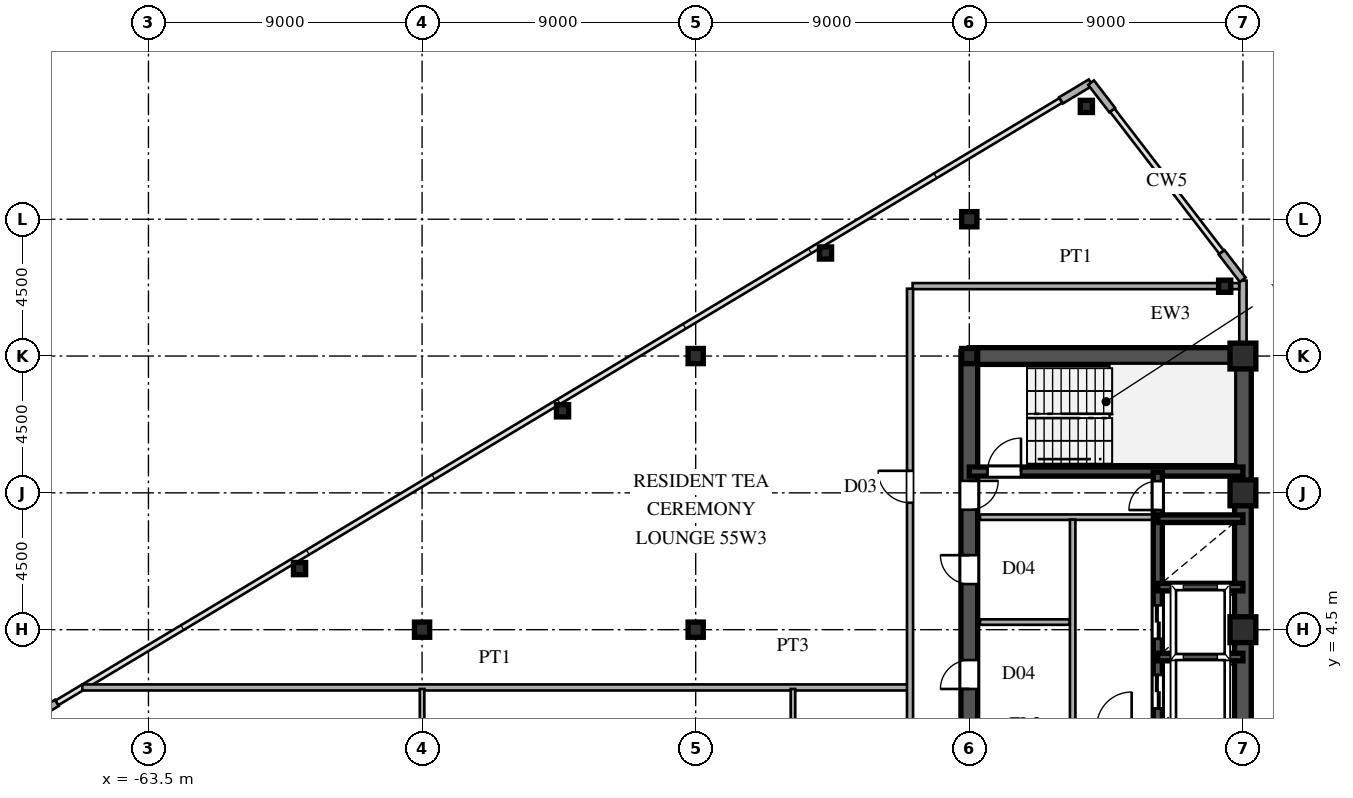
"""IFC4 building model, lengths in metres.
Left out: names, types, materials, properties, quantities, classifications, styles, units other than length and angle.
Written with IfcOpenShell. Run it as: python <this file> out.ifc"""

import sys

from ifc_helpers import new_model, si_unit, direction, frame, frame_2d, origin, origin_2d, place, context, subcontext, project, spatial, rectangle, hollow_rectangle, i_section, extrude, source, transform, mapped, element, fill, save


model = new_model("IFC4")
c1 = context("Model", 3, precision=1e-05, world=origin(), true_north=direction((0.0, 1.0)))
c2 = subcontext(c1, "Body", "Model", "MODEL_VIEW")
j1 = project(units=[si_unit("LENGTHUNIT", "METRE"), si_unit("PLANEANGLEUNIT", "RADIAN")], contexts=[c1])
p1 = place(None, origin())
s1 = spatial("IfcSite", under=j1, at=p1, CompositionType="ELEMENT")
p2 = place(p1, origin())
s2 = spatial("IfcBuilding", under=s1, at=p2, CompositionType="ELEMENT")
p3 = place(p2, frame((0.0, 0.0, 206.7)))
s3 = spatial("IfcBuildingStorey", under=s2, at=p3, CompositionType="ELEMENT", Elevation=206.7)
m1 = source(origin(), c2, "Body", "SweptSolid", [
    extrude(hollow_rectangle(XDim=0.85, YDim=0.85, WallThickness=0.036, at=origin_2d()), origin(), (0.0, 0.0, 1.0), 3.6),
])
for number, where, z_axis, x_axis in (
    (1, (-27.5, 4.5, 0.0), (0.0, 0.0, 1.0), (1.0, 0.0, 0.0)),
    (2, (-27.5, 9.0, 0.0), (0.0, 0.0, 1.0), (1.0, 0.0, 0.0)),
    (3, (-27.5, 13.5, 0.0), (0.0, 0.0, 1.0), (1.0, 0.0, 0.0)),
):
    element("IfcColumn", number, at=place(p3, frame(where, z_axis=z_axis, x_axis=x_axis)), inside=s3, PredefinedType="COLUMN", context=c2, shape_type="MappedRepresentation", body=[
        mapped(m1, transform((0.0, 0.0, 0.0), scale=1.0)),
    ])
m2 = source(origin(), c2, "Body", "SweptSolid", [
    extrude(i_section(OverallWidth=0.5, OverallDepth=0.5, WebThickness=0.02, FlangeThickness=0.032, at=origin_2d()), origin(), (0.0, 0.0, 1.0), 3.6),
])
for number, where, z_axis, x_axis in (
    (4, (-36.5, 13.5, 0.0), (0.0, 0.0, 1.0), (1.0, 0.0, 0.0)),
    (5, (-36.5, 18.0, 0.0), (0.0, 0.0, 1.0), (1.0, 0.0, 0.0)),
    (6, (-45.5, 4.5, 0.0), (0.0, 0.0, 1.0), (1.0, 0.0, 0.0)),
    (7, (-45.5, 13.5, 0.0), (0.0, 0.0, 1.0), (1.0, 0.0, 0.0)),
    (8, (-54.5, 4.5, 0.0), (0.0, 0.0, 1.0), (1.0, 0.0, 0.0)),
):
    element("IfcColumn", number, at=place(p3, frame(where, z_axis=z_axis, x_axis=x_axis)), inside=s3, PredefinedType="COLUMN", context=c2, shape_type="MappedRepresentation", body=[
        mapped(m2, transform((0.0, 0.0, 0.0), scale=1.0)),
    ])
m3 = source(origin(), c2, "Body", "SweptSolid", [
    extrude(hollow_rectangle(XDim=0.4, YDim=0.4, WallThickness=0.016, at=origin_2d()), origin(), (0.0, 0.0, 1.0), 3.6),
])
for number, where, z_axis, x_axis in (
    (9, (-28.1, 15.796, 0.0), (0.0, 0.0, 1.0), (1.0, 0.0, 0.0)),
    (10, (-32.65, 21.71, 0.0), (0.0, 0.0, 1.0), (1.0, 0.0, 0.0)),
    (11, (-41.23, 16.889, 0.0), (0.0, 0.0, 1.0), (1.0, 0.0, 0.0)),
    (12, (-49.88, 11.699, 0.0), (0.0, 0.0, 1.0), (1.0, 0.0, 0.0)),
    (13, (-58.53, 6.509, 0.0), (0.0, 0.0, 1.0), (1.0, 0.0, 0.0)),
):
    element("IfcColumn", number, at=place(p3, frame(where, z_axis=z_axis, x_axis=x_axis)), inside=s3, PredefinedType="COLUMN", context=c2, shape_type="MappedRepresentation", body=[
        mapped(m3, transform((0.0, 0.0, 0.0), scale=1.0)),
    ])
p4 = place(p3, frame((-27.5, 13.78, 0.0), z_axis=(0.0, 0.0, 1.0), x_axis=(0.0, 1.0, 0.0)))
e14 = element("IfcWall", 14, at=p4, inside=s3, PredefinedType="SOLIDWALL", context=c2, shape_type="SweptSolid", body=[
    extrude(rectangle(XDim=0.6, YDim=0.24, at=frame_2d((0.3, 0.0))), origin(), (0.0, 0.0, 1.0), 2.88),
])
p5 = place(p3, frame((-27.5, 14.38, 0.0), z_axis=(0.0, 0.0, 1.0), x_axis=(0.0, 1.0, 0.0)))
e15 = element("IfcWall", 15, at=p5, inside=s3, PredefinedType="SOLIDWALL", context=c2, shape_type="SweptSolid", body=[
    extrude(rectangle(XDim=1.6, YDim=0.24, at=frame_2d((0.8, 0.0))), origin(), (0.0, 0.0, 1.0), 3.38),
])
for number, where, z_axis, x_axis in (
    (16, (-27.506, 16.008, 0.0), (0.0, 0.0, 1.0), (-0.61, 0.793, 0.0)),
    (17, (-31.799, 21.588, 0.0), (0.0, 0.0, 1.0), (-0.61, 0.793, 0.0)),
    (18, (-32.509, 22.495, 0.0), (0.0, 0.0, 1.0), (-0.857, -0.515, 0.0)),
    (19, (-66.514, 2.092, 0.0), (0.0, 0.0, 1.0), (-0.857, -0.515, 0.0)),
):
    element("IfcWall", number, at=place(p3, frame(where, z_axis=z_axis, x_axis=x_axis)), inside=s3, PredefinedType="SOLIDWALL", context=c2, shape_type="SweptSolid", body=[
        extrude(rectangle(XDim=1.14, YDim=0.24, at=frame_2d((0.57, 0.0))), origin(), (0.0, 0.0, 1.0), 3.38),
    ])
p6 = place(p3, frame((-27.5, 1.3, 0.0), z_axis=(0.0, 0.0, 1.0), x_axis=(0.0, 1.0, 0.0)))
e20 = element("IfcWall", 20, at=p6, inside=s3, PredefinedType="SHEAR", context=c2, shape_type="SweptSolid", body=[
    extrude(rectangle(XDim=12.2, YDim=0.55, at=frame_2d((6.1, 0.0))), origin(), (0.0, 0.0, 1.0), 3.38),
])
p7 = place(p3, frame((-36.5, 13.5, 0.0), z_axis=(0.0, 0.0, 1.0), x_axis=(1.0, 0.0, 0.0)))
e21 = element("IfcWall", 21, at=p7, inside=s3, PredefinedType="SHEAR", context=c2, shape_type="SweptSolid", body=[
    extrude(rectangle(XDim=9.0, YDim=0.55, at=frame_2d((4.5, 0.0))), origin(), (0.0, 0.0, 1.0), 3.38),
])
p8 = place(p3, frame((-36.5, 8.2, 0.0), z_axis=(0.0, 0.0, 1.0), x_axis=(0.0, 1.0, 0.0)))
e22 = element("IfcWall", 22, at=p8, inside=s3, PredefinedType="SHEAR", context=c2, shape_type="SweptSolid", body=[
    extrude(rectangle(XDim=5.45, YDim=0.55, at=frame_2d((2.725, 0.0))), origin(), (0.0, 0.0, 1.0), 3.38),
])
p9 = place(p8, frame((0.245, 0.0, 0.0)))
e23 = element("IfcOpeningElement", 23, at=p9, cuts=e22, PredefinedType="OPENING", context=c2, shape_type="SweptSolid", body=[
    extrude(rectangle(XDim=0.95, YDim=2.15, at=frame_2d((0.475, 1.075))), frame((0.0, 0.285, 0.0), z_axis=(0.0, -1.0, 0.0), x_axis=(1.0, 0.0, 0.0)), (0.0, 0.0, 1.0), 0.57),
])
p10 = place(p3, frame((-36.5, 1.3, 0.0), z_axis=(0.0, 0.0, 1.0), x_axis=(0.0, 1.0, 0.0)))
e24 = element("IfcWall", 24, at=p10, inside=s3, PredefinedType="SHEAR", context=c2, shape_type="SweptSolid", body=[
    extrude(rectangle(XDim=3.45, YDim=0.55, at=frame_2d((1.725, 0.0))), origin(), (0.0, 0.0, 1.0), 3.38),
])
p11 = place(p10, frame((1.25, 0.0, 0.0)))
e25 = element("IfcOpeningElement", 25, at=p11, cuts=e24, PredefinedType="OPENING", context=c2, shape_type="SweptSolid", body=[
    extrude(rectangle(XDim=0.95, YDim=2.15, at=frame_2d((0.475, 1.075))), frame((0.0, 0.285, 0.0), z_axis=(0.0, -1.0, 0.0), x_axis=(1.0, 0.0, 0.0)), (0.0, 0.0, 1.0), 0.57),
])
p12 = place(p3, frame((-36.5, 4.75, 0.0), z_axis=(0.0, 0.0, 1.0), x_axis=(0.0, 1.0, 0.0)))
e26 = element("IfcWall", 26, at=p12, inside=s3, PredefinedType="SHEAR", context=c2, shape_type="SweptSolid", body=[
    extrude(rectangle(XDim=3.45, YDim=0.55, at=frame_2d((1.725, 0.0))), origin(), (0.0, 0.0, 1.0), 3.38),
])
p13 = place(p12, frame((1.25, 0.0, 0.0)))
e27 = element("IfcOpeningElement", 27, at=p13, cuts=e26, PredefinedType="OPENING", context=c2, shape_type="SweptSolid", body=[
    extrude(rectangle(XDim=0.95, YDim=2.15, at=frame_2d((0.475, 1.075))), frame((0.0, 0.285, 0.0), z_axis=(0.0, -1.0, 0.0), x_axis=(1.0, 0.0, 0.0)), (0.0, 0.0, 1.0), 0.57),
])
p14 = place(p3, frame((-36.5, 9.7, 0.0), z_axis=(0.0, 0.0, 1.0), x_axis=(1.0, 0.0, 0.0)))
e28 = element("IfcWall", 28, at=p14, inside=s3, PredefinedType="SHEAR", context=c2, shape_type="SweptSolid", body=[
    extrude(rectangle(XDim=9.0, YDim=0.3, at=frame_2d((4.5, 0.0))), origin(), (0.0, 0.0, 1.0), 3.38),
])
p15 = place(p14, frame((0.6, 0.0, 0.0)))
e29 = element("IfcOpeningElement", 29, at=p15, cuts=e28, PredefinedType="OPENING", context=c2, shape_type="SweptSolid", body=[
    extrude(rectangle(XDim=1.1, YDim=2.2, at=frame_2d((0.55, 1.1))), frame((0.0, 0.16, 0.0), z_axis=(0.0, -1.0, 0.0), x_axis=(1.0, 0.0, 0.0)), (0.0, 0.0, 1.0), 0.32),
])
for number, where, z_axis, x_axis in (
    (30, (-30.3, 3.6, 0.0), (0.0, 0.0, 1.0), (1.0, 0.0, 0.0)),
    (31, (-30.3, 5.9, 0.0), (0.0, 0.0, 1.0), (1.0, 0.0, 0.0)),
    (32, (-30.3, 8.15, 0.0), (0.0, 0.0, 1.0), (1.0, 0.0, 0.0)),
):
    element("IfcWall", number, at=place(p3, frame(where, z_axis=z_axis, x_axis=x_axis)), inside=s3, PredefinedType="SHEAR", context=c2, shape_type="SweptSolid", body=[
        extrude(rectangle(XDim=2.8, YDim=0.25, at=frame_2d((1.4, 0.0))), origin(), (0.0, 0.0, 1.0), 3.38),
    ])
p16 = place(p3, frame((-30.3, 1.32, 0.0), z_axis=(0.0, 0.0, 1.0), x_axis=(0.0, 1.0, 0.0)))
e33 = element("IfcWall", 33, at=p16, inside=s3, PredefinedType="SHEAR", context=c2, shape_type="SweptSolid", body=[
    extrude(rectangle(XDim=2.28, YDim=0.3, at=frame_2d((1.14, 0.0))), origin(), (0.0, 0.0, 1.0), 3.38),
])
p17 = place(p16, frame((0.59, 0.0, 0.0)))
e34 = element("IfcOpeningElement", 34, at=p17, cuts=e33, PredefinedType="OPENING", context=c2, shape_type="SweptSolid", body=[
    extrude(rectangle(XDim=1.1, YDim=2.2, at=frame_2d((0.55, 1.1))), frame((0.0, 0.16, 0.0), z_axis=(0.0, -1.0, 0.0), x_axis=(1.0, 0.0, 0.0)), (0.0, 0.0, 1.0), 0.32),
])
p18 = place(p3, frame((-30.3, 3.6, 0.0), z_axis=(0.0, 0.0, 1.0), x_axis=(0.0, 1.0, 0.0)))
e35 = element("IfcWall", 35, at=p18, inside=s3, PredefinedType="SHEAR", context=c2, shape_type="SweptSolid", body=[
    extrude(rectangle(XDim=2.3, YDim=0.3, at=frame_2d((1.15, 0.0))), origin(), (0.0, 0.0, 1.0), 3.38),
])
p19 = place(p18, frame((0.6, 0.0, 0.0)))
e36 = element("IfcOpeningElement", 36, at=p19, cuts=e35, PredefinedType="OPENING", context=c2, shape_type="SweptSolid", body=[
    extrude(rectangle(XDim=1.1, YDim=2.2, at=frame_2d((0.55, 1.1))), frame((0.0, 0.16, 0.0), z_axis=(0.0, -1.0, 0.0), x_axis=(1.0, 0.0, 0.0)), (0.0, 0.0, 1.0), 0.32),
])
p20 = place(p3, frame((-30.3, 5.9, 0.0), z_axis=(0.0, 0.0, 1.0), x_axis=(0.0, 1.0, 0.0)))
e37 = element("IfcWall", 37, at=p20, inside=s3, PredefinedType="SHEAR", context=c2, shape_type="SweptSolid", body=[
    extrude(rectangle(XDim=2.25, YDim=0.3, at=frame_2d((1.125, 0.0))), origin(), (0.0, 0.0, 1.0), 3.38),
])
p21 = place(p3, frame((-30.3, 8.15, 0.0), z_axis=(0.0, 0.0, 1.0), x_axis=(0.0, 1.0, 0.0)))
e38 = element("IfcWall", 38, at=p21, inside=s3, PredefinedType="SHEAR", context=c2, shape_type="SweptSolid", body=[
    extrude(rectangle(XDim=1.53, YDim=0.3, at=frame_2d((0.765, 0.0))), origin(), (0.0, 0.0, 1.0), 3.38),
])
p22 = place(p21, frame((0.285, 0.0, 0.0)))
e39 = element("IfcOpeningElement", 39, at=p22, cuts=e38, PredefinedType="OPENING", context=c2, shape_type="SweptSolid", body=[
    extrude(rectangle(XDim=0.95, YDim=2.15, at=frame_2d((0.475, 1.075))), frame((0.0, 0.16, 0.0), z_axis=(0.0, -1.0, 0.0), x_axis=(1.0, 0.0, 0.0)), (0.0, 0.0, 1.0), 0.32),
])
p23 = place(p3, frame((-36.15, 8.2, 0.0), z_axis=(0.0, 0.0, 1.0), x_axis=(1.0, 0.0, 0.0)))
e40 = element("IfcWall", 40, at=p23, inside=s3, PredefinedType="PARTITIONING", context=c2, shape_type="SweptSolid", body=[
    extrude(rectangle(XDim=5.7, YDim=0.18, at=frame_2d((2.85, 0.0))), origin(), (0.0, 0.0, 1.0), 3.38),
])
p24 = place(p3, frame((-33.1, 1.38, 0.0), z_axis=(0.0, 0.0, 1.0), x_axis=(0.0, 1.0, 0.0)))
e41 = element("IfcWall", 41, at=p24, inside=s3, PredefinedType="PARTITIONING", context=c2, shape_type="SweptSolid", body=[
    extrude(rectangle(XDim=6.74, YDim=0.18, at=frame_2d((3.37, 0.0))), origin(), (0.0, 0.0, 1.0), 3.38),
])
p25 = place(p3, frame((-36.15, 4.75, 0.0), z_axis=(0.0, 0.0, 1.0), x_axis=(1.0, 0.0, 0.0)))
e42 = element("IfcWall", 42, at=p25, inside=s3, PredefinedType="PARTITIONING", context=c2, shape_type="SweptSolid", body=[
    extrude(rectangle(XDim=2.95, YDim=0.18, at=frame_2d((1.475, 0.0))), origin(), (0.0, 0.0, 1.0), 3.38),
])
p26 = place(p3, frame((-65.676, 2.6, 0.0), z_axis=(0.0, 0.0, 1.0), x_axis=(1.0, 0.0, 0.0)))
e43 = element("IfcWall", 43, at=p26, inside=s3, PredefinedType="PARTITIONING", context=c2, shape_type="SweptSolid", body=[
    extrude(rectangle(XDim=27.146, YDim=0.2, at=frame_2d((13.573, 0.0))), origin(), (0.0, 0.0, 1.0), 3.38),
])
p27 = place(p3, frame((-38.365, 15.8, 0.0), z_axis=(0.0, 0.0, 1.0), x_axis=(1.0, 0.0, 0.0)))
e44 = element("IfcWall", 44, at=p27, inside=s3, PredefinedType="PARTITIONING", context=c2, shape_type="SweptSolid", body=[
    extrude(rectangle(XDim=10.74, YDim=0.2, at=frame_2d((5.37, 0.0))), origin(), (0.0, 0.0, 1.0), 3.38),
])
p28 = place(p3, frame((-54.5, -9.335, 0.0), z_axis=(0.0, 0.0, 1.0), x_axis=(0.0, 1.0, 0.0)))
e45 = element("IfcWall", 45, at=p28, inside=s3, PredefinedType="PARTITIONING", context=c2, shape_type="SweptSolid", body=[
    extrude(rectangle(XDim=11.885, YDim=0.15, at=frame_2d((5.942, 0.0))), origin(), (0.0, 0.0, 1.0), 2.78),
])
p29 = place(p28, frame((5.16, 0.0, 0.0)))
e46 = element("IfcOpeningElement", 46, at=p29, cuts=e45, PredefinedType="OPENING", context=c2, shape_type="SweptSolid", body=[
    extrude(rectangle(XDim=0.95, YDim=2.15, at=frame_2d((0.475, 1.075))), frame((0.0, 0.085, 0.0), z_axis=(0.0, -1.0, 0.0), x_axis=(1.0, 0.0, 0.0)), (0.0, 0.0, 1.0), 0.17),
])
p30 = place(p3, frame((-42.3, -1.128, 0.0), z_axis=(0.0, 0.0, 1.0), x_axis=(0.0, 1.0, 0.0)))
e47 = element("IfcWall", 47, at=p30, inside=s3, PredefinedType="PARTITIONING", context=c2, shape_type="SweptSolid", body=[
    extrude(rectangle(XDim=3.678, YDim=0.15, at=frame_2d((1.839, 0.0))), origin(), (0.0, 0.0, 1.0), 3.38),
])
p31 = place(p3, frame((-38.45, -15.715, 0.0), z_axis=(0.0, 0.0, 1.0), x_axis=(0.0, 1.0, 0.0)))
e48 = element("IfcWall", 48, at=p31, inside=s3, PredefinedType="PARTITIONING", context=c2, shape_type="SweptSolid", body=[
    extrude(rectangle(XDim=31.43, YDim=0.2, at=frame_2d((15.715, 0.0))), origin(), (0.0, 0.0, 1.0), 3.38),
])
p32 = place(p31, frame((2.29, 0.0, 0.0)))
e49 = element("IfcOpeningElement", 49, at=p32, cuts=e48, PredefinedType="OPENING", context=c2, shape_type="SweptSolid", body=[
    extrude(rectangle(XDim=1.05, YDim=2.25, at=frame_2d((0.525, 1.125))), frame((0.0, 0.11, 0.0), z_axis=(0.0, -1.0, 0.0), x_axis=(1.0, 0.0, 0.0)), (0.0, 0.0, 1.0), 0.22),
])
p33 = place(p31, frame((11.301, 0.0, 0.0)))
e50 = element("IfcOpeningElement", 50, at=p33, cuts=e48, PredefinedType="OPENING", context=c2, shape_type="SweptSolid", body=[
    extrude(rectangle(XDim=1.05, YDim=2.25, at=frame_2d((0.525, 1.125))), frame((0.0, 0.11, 0.0), z_axis=(0.0, -1.0, 0.0), x_axis=(1.0, 0.0, 0.0)), (0.0, 0.0, 1.0), 0.22),
])
p34 = place(p31, frame((24.39, 0.0, 0.0)))
e51 = element("IfcOpeningElement", 51, at=p34, cuts=e48, PredefinedType="OPENING", context=c2, shape_type="SweptSolid", body=[
    extrude(rectangle(XDim=1.05, YDim=2.25, at=frame_2d((0.525, 1.125))), frame((0.0, 0.11, 0.0), z_axis=(0.0, -1.0, 0.0), x_axis=(1.0, 0.0, 0.0)), (0.0, 0.0, 1.0), 0.22),
])
m4 = source(origin(), c2, "Body", "SweptSolid", [
    extrude(rectangle(XDim=0.95, YDim=2.15, at=frame_2d((0.475, 1.075))), frame((0.0, 0.025, 0.0), z_axis=(0.0, -1.0, 0.0), x_axis=(1.0, 0.0, 0.0)), (0.0, 0.0, 1.0), 0.05),
])
p35 = place(p9, frame((0.95, 0.0, 0.0), z_axis=(0.0, 0.0, 1.0), x_axis=(-1.0, 0.0, 0.0)))
e52 = element("IfcDoor", 52, at=p35, inside=s3, OperationType="SINGLE_SWING_RIGHT", PredefinedType="DOOR", context=c2, shape_type="MappedRepresentation", body=[
    mapped(m4, transform((0.0, 0.0, 0.0), scale=1.0)),
])
fill(e23, e52)
p36 = place(p11, origin())
e53 = element("IfcDoor", 53, at=p36, inside=s3, OperationType="SINGLE_SWING_LEFT", PredefinedType="DOOR", context=c2, shape_type="MappedRepresentation", body=[
    mapped(m4, transform((0.0, 0.0, 0.0), scale=1.0)),
])
fill(e25, e53)
p37 = place(p13, origin())
e54 = element("IfcDoor", 54, at=p37, inside=s3, OperationType="SINGLE_SWING_RIGHT", PredefinedType="DOOR", context=c2, shape_type="MappedRepresentation", body=[
    mapped(m4, transform((0.0, 0.0, 0.0), scale=1.0)),
])
fill(e27, e54)
m5 = source(origin(), c2, "Body", "SweptSolid", [
    extrude(rectangle(XDim=1.1, YDim=2.2, at=frame_2d((0.55, 1.1))), frame((0.0, 0.025, 0.0), z_axis=(0.0, -1.0, 0.0), x_axis=(1.0, 0.0, 0.0)), (0.0, 0.0, 1.0), 0.05),
])
p38 = place(p15, origin())
e55 = element("IfcDoor", 55, at=p38, inside=s3, OperationType="SINGLE_SWING_RIGHT", PredefinedType="DOOR", context=c2, shape_type="MappedRepresentation", body=[
    mapped(m5, transform((0.0, 0.0, 0.0), scale=1.0)),
])
fill(e29, e55)
m6 = source(origin(), c2, "Body", "SweptSolid", [
    extrude(rectangle(XDim=1.1, YDim=2.2, at=frame_2d((0.55, 1.1))), frame((0.0, 0.025, 0.0), z_axis=(0.0, -1.0, 0.0), x_axis=(1.0, 0.0, 0.0)), (0.0, 0.0, 1.0), 0.05),
])
p39 = place(p17, origin())
e56 = element("IfcDoor", 56, at=p39, inside=s3, OperationType="DOUBLE_DOOR_SLIDING", PredefinedType="DOOR", context=c2, shape_type="MappedRepresentation", body=[
    mapped(m6, transform((0.0, 0.0, 0.0), scale=1.0)),
])
fill(e34, e56)
p40 = place(p19, origin())
e57 = element("IfcDoor", 57, at=p40, inside=s3, OperationType="DOUBLE_DOOR_SLIDING", PredefinedType="DOOR", context=c2, shape_type="MappedRepresentation", body=[
    mapped(m6, transform((0.0, 0.0, 0.0), scale=1.0)),
])
fill(e36, e57)
p41 = place(p22, origin())
e58 = element("IfcDoor", 58, at=p41, inside=s3, OperationType="SINGLE_SWING_LEFT", PredefinedType="DOOR", context=c2, shape_type="MappedRepresentation", body=[
    mapped(m4, transform((0.0, 0.0, 0.0), scale=1.0)),
])
fill(e39, e58)
m7 = source(origin(), c2, "Body", "SweptSolid", [
    extrude(rectangle(XDim=1.05, YDim=2.25, at=frame_2d((0.525, 1.125))), frame((0.0, 0.025, 0.0), z_axis=(0.0, -1.0, 0.0), x_axis=(1.0, 0.0, 0.0)), (0.0, 0.0, 1.0), 0.05),
])
p42 = place(p34, origin())
e59 = element("IfcDoor", 59, at=p42, inside=s3, OperationType="SINGLE_SWING_RIGHT", PredefinedType="DOOR", context=c2, shape_type="MappedRepresentation", body=[
    mapped(m7, transform((0.0, 0.0, 0.0), scale=1.0)),
])
fill(e51, e59)
save(model, sys.argv[1])
